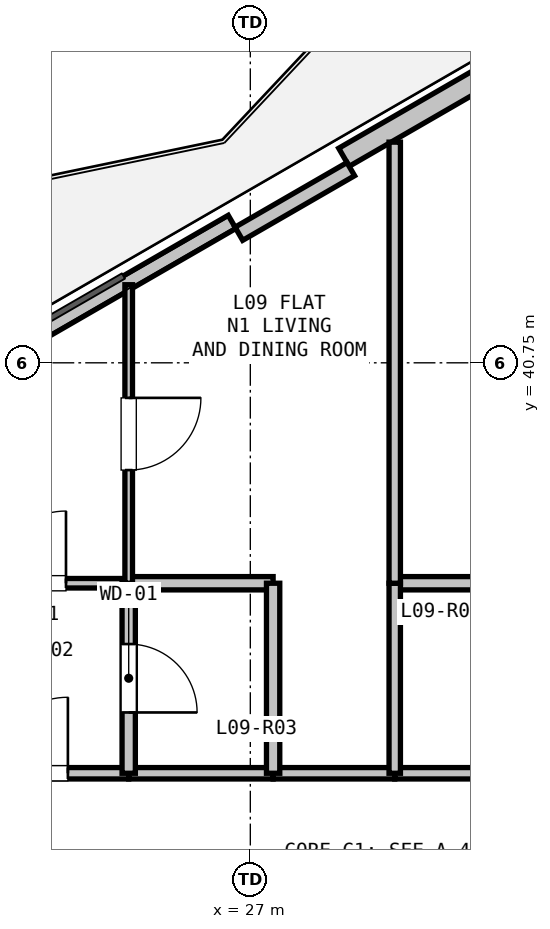
"""IFC4 building model, lengths in metres.
Left out: names, types, materials, properties, quantities, classifications, styles, units other than length and angle.
Written with IfcOpenShell. Run it as: python <this file> out.ifc"""

import sys

from ifc_helpers import new_model, si_unit, direction, frame, frame_2d, origin, place, context, subcontext, project, spatial, rectangle, extrude, element, fill, save


model = new_model("IFC4")
c1 = context("Model", 3, precision=1e-05, world=origin(), true_north=direction((0.0, 1.0)))
c2 = subcontext(c1, "Body", "Model", "MODEL_VIEW")
j1 = project(units=[si_unit("LENGTHUNIT", "METRE"), si_unit("PLANEANGLEUNIT", "RADIAN")], contexts=[c1])
p1 = place(None, origin())
s1 = spatial("IfcSite", under=j1, at=p1, CompositionType="ELEMENT")
p2 = place(p1, origin())
s2 = spatial("IfcBuilding", under=s1, at=p2, CompositionType="ELEMENT")
p3 = place(p2, frame((0.0, 0.0, 35.7)))
s3 = spatial("IfcBuildingStorey", under=s2, at=p3, CompositionType="ELEMENT", Elevation=35.7)
p4 = place(p3, frame((16.39, 36.617, 0.0), z_axis=(0.0, 0.0, 1.0), x_axis=(0.866027351828, 0.499996625875, 0.0)))
e1 = element("IfcWall", 1, at=p4, inside=s3, PredefinedType="PARAPET", context=c2, shape_type="SweptSolid", body=[
    extrude(rectangle(XDim=11.973, YDim=0.2, at=frame_2d((5.987, 0.0))), origin(), (0.0, 0.0, 1.0), 0.2),
])
p5 = place(p3, frame((28.232, 43.454, 0.0), z_axis=(0.0, 0.0, 1.0), x_axis=(0.86603192154, 0.499988710747, 0.0)))
e2 = element("IfcWall", 2, at=p5, inside=s3, PredefinedType="SOLIDWALL", context=c2, shape_type="SweptSolid", body=[
    extrude(rectangle(XDim=12.673, YDim=0.275, at=frame_2d((6.336, 0.0))), origin(), (0.0, 0.0, 1.0), 2.66),
])
p6 = place(p5, frame((2.96, 0.0, 0.9)))
e3 = element("IfcOpeningElement", 3, at=p6, cuts=e2, PredefinedType="OPENING", context=c2, shape_type="SweptSolid", body=[
    extrude(rectangle(XDim=2.1, YDim=1.6, at=frame_2d((1.05, 0.8))), frame((0.0, 0.147, 0.0), z_axis=(0.0, -1.0, 0.0), x_axis=(1.0, 0.0, 0.0)), (0.0, 0.0, 1.0), 0.295),
])
p7 = place(p3, frame((26.85, 42.448, 0.0), z_axis=(0.0, 0.0, 1.0), x_axis=(0.86605165483, 0.499954529098, 0.0)))
e4 = element("IfcWall", 4, at=p7, inside=s3, PredefinedType="PARAPET", context=c2, shape_type="SweptSolid", body=[
    extrude(rectangle(XDim=1.7, YDim=0.2, at=frame_2d((0.85, 0.0))), origin(), (0.0, 0.0, 1.0), 2.66),
])
p8 = place(p3, frame((22.8, 35.35, 0.0), z_axis=(0.0, 0.0, 1.0), x_axis=(1.0, 0.0, 0.0)))
e5 = element("IfcWall", 5, at=p8, inside=s3, PredefinedType="PARTITIONING", context=c2, shape_type="SweptSolid", body=[
    extrude(rectangle(XDim=2.6, YDim=0.15, at=frame_2d((1.3, 0.0))), origin(), (0.0, 0.0, 1.0), 3.04),
])
p9 = place(p8, frame((0.8, 0.0, 0.0)))
e6 = element("IfcOpeningElement", 6, at=p9, cuts=e5, PredefinedType="OPENING", context=c2, shape_type="SweptSolid", body=[
    extrude(rectangle(XDim=1.0, YDim=2.15, at=frame_2d((0.5, 1.075))), frame((0.0, 0.085, 0.0), z_axis=(0.0, -1.0, 0.0), x_axis=(1.0, 0.0, 0.0)), (0.0, 0.0, 1.0), 0.17),
])
p10 = place(p3, frame((25.4, 35.35, 0.0), z_axis=(0.0, 0.0, 1.0), x_axis=(1.0, 0.0, 0.0)))
e7 = element("IfcWall", 7, at=p10, inside=s3, PredefinedType="PARTITIONING", context=c2, shape_type="SweptSolid", body=[
    extrude(rectangle(XDim=1.9, YDim=0.15, at=frame_2d((0.95, 0.0))), origin(), (0.0, 0.0, 1.0), 3.04),
])
p11 = place(p3, frame((27.3, 35.35, 0.0), z_axis=(0.0, 0.0, 1.0), x_axis=(1.0, 0.0, 0.0)))
e8 = element("IfcWall", 8, at=p11, inside=s3, PredefinedType="PARTITIONING", context=c2, shape_type="SweptSolid", body=[
    extrude(rectangle(XDim=1.6, YDim=0.15, at=frame_2d((0.8, 0.0))), origin(), (0.0, 0.0, 1.0), 3.04),
])
p12 = place(p3, frame((28.9, 35.35, 0.0), z_axis=(0.0, 0.0, 1.0), x_axis=(1.0, 0.0, 0.0)))
e9 = element("IfcWall", 9, at=p12, inside=s3, PredefinedType="PARTITIONING", context=c2, shape_type="SweptSolid", body=[
    extrude(rectangle(XDim=2.0, YDim=0.15, at=frame_2d((1.0, 0.0))), origin(), (0.0, 0.0, 1.0), 3.04),
])
p13 = place(p3, frame((22.8, 37.85, 0.0), z_axis=(0.0, 0.0, 1.0), x_axis=(1.0, 0.0, 0.0)))
e10 = element("IfcWall", 10, at=p13, inside=s3, PredefinedType="PARTITIONING", context=c2, shape_type="SweptSolid", body=[
    extrude(rectangle(XDim=2.6, YDim=0.125, at=frame_2d((1.3, 0.0))), origin(), (0.0, 0.0, 1.0), 3.04),
])
p14 = place(p13, frame((0.825, 0.0, 0.0)))
e11 = element("IfcOpeningElement", 11, at=p14, cuts=e10, PredefinedType="OPENING", context=c2, shape_type="SweptSolid", body=[
    extrude(rectangle(XDim=0.95, YDim=2.1, at=frame_2d((0.475, 1.05))), frame((0.0, 0.073, 0.0), z_axis=(0.0, -1.0, 0.0), x_axis=(1.0, 0.0, 0.0)), (0.0, 0.0, 1.0), 0.145),
])
p15 = place(p3, frame((25.4, 37.85, 0.0), z_axis=(0.0, 0.0, 1.0), x_axis=(0.0, -1.0, 0.0)))
e12 = element("IfcWall", 12, at=p15, inside=s3, PredefinedType="PLUMBINGWALL", context=c2, shape_type="SweptSolid", body=[
    extrude(rectangle(XDim=2.5, YDim=0.175, at=frame_2d((1.25, 0.0))), origin(), (0.0, 0.0, 1.0), 3.04),
])
p16 = place(p15, frame((0.8, 0.0, 0.0)))
e13 = element("IfcOpeningElement", 13, at=p16, cuts=e12, PredefinedType="OPENING", context=c2, shape_type="SweptSolid", body=[
    extrude(rectangle(XDim=0.9, YDim=2.1, at=frame_2d((0.45, 1.05))), frame((0.0, 0.097, 0.0), z_axis=(0.0, -1.0, 0.0), x_axis=(1.0, 0.0, 0.0)), (0.0, 0.0, 1.0), 0.195),
])
p17 = place(p3, frame((25.4, 37.85, 0.0), z_axis=(0.0, 0.0, 1.0), x_axis=(1.0, 0.0, 0.0)))
e14 = element("IfcWall", 14, at=p17, inside=s3, PredefinedType="PLUMBINGWALL", context=c2, shape_type="SweptSolid", body=[
    extrude(rectangle(XDim=1.9, YDim=0.175, at=frame_2d((0.95, 0.0))), origin(), (0.0, 0.0, 1.0), 3.04),
])
p18 = place(p3, frame((27.3, 37.85, 0.0), z_axis=(0.0, 0.0, 1.0), x_axis=(0.0, -1.0, 0.0)))
e15 = element("IfcWall", 15, at=p18, inside=s3, PredefinedType="PLUMBINGWALL", context=c2, shape_type="SweptSolid", body=[
    extrude(rectangle(XDim=2.5, YDim=0.175, at=frame_2d((1.25, 0.0))), origin(), (0.0, 0.0, 1.0), 3.04),
])
p19 = place(p3, frame((28.9, 37.85, 0.0), z_axis=(0.0, 0.0, 1.0), x_axis=(1.0, 0.0, 0.0)))
e16 = element("IfcWall", 16, at=p19, inside=s3, PredefinedType="PLUMBINGWALL", context=c2, shape_type="SweptSolid", body=[
    extrude(rectangle(XDim=2.0, YDim=0.175, at=frame_2d((1.0, 0.0))), origin(), (0.0, 0.0, 1.0), 3.04),
])
p20 = place(p3, frame((28.9, 35.35, 0.0), z_axis=(0.0, 0.0, 1.0), x_axis=(0.0, 1.0, 0.0)))
e17 = element("IfcWall", 17, at=p20, inside=s3, PredefinedType="PARTITIONING", context=c2, shape_type="SweptSolid", body=[
    extrude(rectangle(XDim=2.5, YDim=0.15, at=frame_2d((1.25, 0.0))), origin(), (0.0, 0.0, 1.0), 3.04),
])
p21 = place(p3, frame((25.4, 41.777, 0.0), z_axis=(0.0, 0.0, 1.0), x_axis=(0.0, -1.0, 0.0)))
e18 = element("IfcWall", 18, at=p21, inside=s3, PredefinedType="PARTITIONING", context=c2, shape_type="SweptSolid", body=[
    extrude(rectangle(XDim=3.927, YDim=0.1, at=frame_2d((1.964, 0.0))), origin(), (0.0, 0.0, 1.0), 2.365),
])
p22 = place(p21, frame((1.489, 0.0, 0.0)))
e19 = element("IfcOpeningElement", 19, at=p22, cuts=e18, PredefinedType="OPENING", context=c2, shape_type="SweptSolid", body=[
    extrude(rectangle(XDim=0.95, YDim=2.1, at=frame_2d((0.475, 1.05))), frame((0.0, 0.06, 0.0), z_axis=(0.0, -1.0, 0.0), x_axis=(1.0, 0.0, 0.0)), (0.0, 0.0, 1.0), 0.12),
])
p23 = place(p3, frame((28.9, 43.653, 0.0), z_axis=(0.0, 0.0, 1.0), x_axis=(0.0, -1.0, 0.0)))
e20 = element("IfcWall", 20, at=p23, inside=s3, PredefinedType="PARTITIONING", context=c2, shape_type="SweptSolid", body=[
    extrude(rectangle(XDim=5.803, YDim=0.15, at=frame_2d((2.901, 0.0))), origin(), (0.0, 0.0, 1.0), 2.365),
])
p24 = place(p9, origin())
e21 = element("IfcDoor", 21, at=p24, inside=s3, OperationType="SINGLE_SWING_RIGHT", PredefinedType="DOOR", context=c2, shape_type="SweptSolid", body=[
    extrude(rectangle(XDim=1.0, YDim=2.15, at=frame_2d((0.5, 1.075))), frame((0.0, 0.025, 0.0), z_axis=(0.0, -1.0, 0.0), x_axis=(1.0, 0.0, 0.0)), (0.0, 0.0, 1.0), 0.05),
])
fill(e6, e21)
p25 = place(p16, origin())
e22 = element("IfcDoor", 22, at=p25, inside=s3, OperationType="SINGLE_SWING_RIGHT", PredefinedType="DOOR", context=c2, shape_type="SweptSolid", body=[
    extrude(rectangle(XDim=0.9, YDim=2.1, at=frame_2d((0.45, 1.05))), frame((0.0, 0.025, 0.0), z_axis=(0.0, -1.0, 0.0), x_axis=(1.0, 0.0, 0.0)), (0.0, 0.0, 1.0), 0.05),
])
fill(e13, e22)
p26 = place(p14, origin())
e23 = element("IfcDoor", 23, at=p26, inside=s3, OperationType="SINGLE_SWING_RIGHT", PredefinedType="DOOR", context=c2, shape_type="SweptSolid", body=[
    extrude(rectangle(XDim=0.95, YDim=2.1, at=frame_2d((0.475, 1.05))), frame((0.0, 0.025, 0.0), z_axis=(0.0, -1.0, 0.0), x_axis=(1.0, 0.0, 0.0)), (0.0, 0.0, 1.0), 0.05),
])
fill(e11, e23)
p27 = place(p22, origin())
e24 = element("IfcDoor", 24, at=p27, inside=s3, OperationType="SINGLE_SWING_LEFT", PredefinedType="DOOR", context=c2, shape_type="SweptSolid", body=[
    extrude(rectangle(XDim=0.95, YDim=2.1, at=frame_2d((0.475, 1.05))), frame((0.0, 0.025, 0.0), z_axis=(0.0, -1.0, 0.0), x_axis=(1.0, 0.0, 0.0)), (0.0, 0.0, 1.0), 0.05),
])
fill(e19, e24)
save(model, sys.argv[1])
